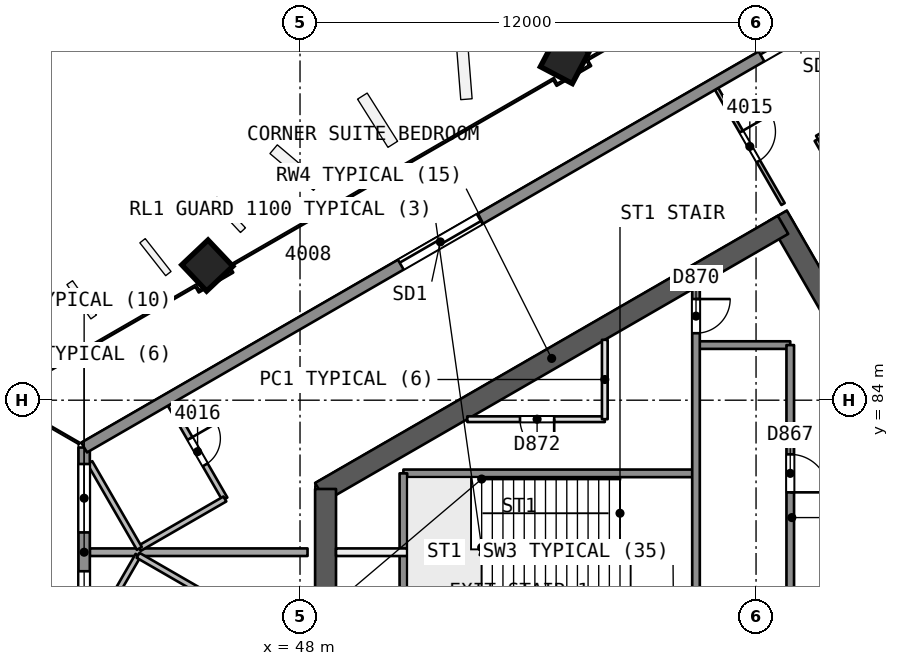
"""IFC4 building model, lengths in metres.
Left out: names, types, materials, properties, quantities, classifications, styles, units other than length and angle.
Written with IfcOpenShell. Run it as: python <this file> out.ifc"""

import sys

from ifc_helpers import new_model, si_unit, direction, frame, frame_2d, origin, origin_2d, place, context, subcontext, project, spatial, rectangle, extrude, element, fill, save


model = new_model("IFC4")
c1 = context("Model", 3, precision=1e-05, world=origin(), true_north=direction((0.0, 1.0)))
c2 = subcontext(c1, "Body", "Model", "MODEL_VIEW")
j1 = project(units=[si_unit("LENGTHUNIT", "METRE"), si_unit("PLANEANGLEUNIT", "RADIAN")], contexts=[c1])
p1 = place(None, origin())
s1 = spatial("IfcSite", under=j1, at=p1, CompositionType="ELEMENT")
p2 = place(p1, origin())
s2 = spatial("IfcBuilding", under=s1, at=p2, CompositionType="ELEMENT")
p3 = place(p2, frame((0.0, 0.0, 167.4)))
s3 = spatial("IfcBuildingStorey", under=s2, at=p3, CompositionType="ELEMENT", Elevation=167.4)
p4 = place(p3, frame((65.682, 80.0, 0.0), z_axis=(0.0, 0.0, 1.0), x_axis=(-0.500000202252, 0.866025287014, 0.0)))
e1 = element("IfcWall", 1, at=p4, inside=s3, PredefinedType="SHEAR", context=c2, shape_type="SweptSolid", body=[
    extrude(rectangle(XDim=10.221, YDim=0.55, at=frame_2d((5.111, 0.0))), origin(), (0.0, 0.0, 1.0), 3.7),
])
p5 = place(p4, frame((0.791, 0.0, 0.0)))
e2 = element("IfcOpeningElement", 2, at=p5, cuts=e1, PredefinedType="OPENING", context=c2, shape_type="SweptSolid", body=[
    extrude(rectangle(XDim=1.2, YDim=2.1, at=frame_2d((0.6, 1.05))), frame((0.0, 0.286, 0.0), z_axis=(0.0, -1.0, 0.0), x_axis=(1.0, 0.0, 0.0)), (0.0, 0.0, 1.0), 0.571),
])
p6 = place(p3, frame((60.709, 88.614, 0.0), z_axis=(0.0, 0.0, 1.0), x_axis=(-0.866020164116, -0.500009075263, 0.0)))
e3 = element("IfcWall", 3, at=p6, inside=s3, PredefinedType="SHEAR", context=c2, shape_type="SweptSolid", body=[
    extrude(rectangle(XDim=14.058, YDim=0.55, at=frame_2d((7.029, 0.0))), origin(), (0.0, 0.0, 1.0), 3.7),
])
p7 = place(p3, frame((48.672, 81.664, 0.0), z_axis=(0.0, 0.0, 1.0), x_axis=(0.0, -1.0, 0.0)))
e4 = element("IfcWall", 4, at=p7, inside=s3, PredefinedType="SHEAR", context=c2, shape_type="SweptSolid", body=[
    extrude(rectangle(XDim=3.487, YDim=0.55, at=frame_2d((1.743, 0.0))), origin(), (0.0, 0.0, 1.0), 3.7),
])
p8 = place(p3, frame((60.709, 71.386, 0.0), z_axis=(0.0, 0.0, 1.0), x_axis=(0.500015938302, 0.866016201606, 0.0)))
e5 = element("IfcWall", 5, at=p8, inside=s3, PredefinedType="SHEAR", context=c2, shape_type="SweptSolid", body=[
    extrude(rectangle(XDim=10.105, YDim=0.55, at=frame_2d((5.053, 0.0))), origin(), (0.0, 0.0, 1.0), 3.7),
])
p9 = place(p8, frame((7.955, 0.0, 0.0)))
e6 = element("IfcOpeningElement", 6, at=p9, cuts=e5, PredefinedType="OPENING", context=c2, shape_type="SweptSolid", body=[
    extrude(rectangle(XDim=1.2, YDim=2.1, at=frame_2d((0.6, 1.05))), frame((0.0, 0.286, 0.0), z_axis=(0.0, -1.0, 0.0), x_axis=(1.0, 0.0, 0.0)), (0.0, 0.0, 1.0), 0.571),
])
p10 = place(p3, frame((54.944, 92.988, 0.0), z_axis=(0.019327242333, -0.012137244332, 0.999739538582), x_axis=(-0.500208874039, 0.865669601935, 0.020179757644)))
e7 = element("IfcColumn", 7, at=p10, inside=s3, PredefinedType="COLUMN", context=c2, shape_type="SweptSolid", body=[
    extrude(rectangle(XDim=0.95, YDim=0.95, at=origin_2d()), origin(), (0.0, 0.0, 1.0), 3.701),
])
p11 = place(p3, frame((45.526, 87.551, 0.0), z_axis=(0.028557232129, -0.006793059837, 0.999569076568), x_axis=(-0.500407681469, 0.865554719029, 0.0201787188)))
e8 = element("IfcColumn", 8, at=p11, inside=s3, PredefinedType="COLUMN", context=c2, shape_type="SweptSolid", body=[
    extrude(rectangle(XDim=0.95, YDim=0.95, at=origin_2d()), origin(), (0.0, 0.0, 1.0), 3.702),
])
p12 = place(p3, frame((58.961, 92.191, 0.0), z_axis=(0.0, 0.0, 1.0), x_axis=(0.499982229883, -0.866035663123, 0.0)))
e9 = element("IfcWall", 9, at=p12, inside=s3, PredefinedType="PARTITIONING", context=c2, shape_type="SweptSolid", body=[
    extrude(rectangle(XDim=3.498, YDim=0.1, at=frame_2d((1.749, 0.0))), origin(), (0.0, 0.0, 1.0), 3.25),
])
p13 = place(p12, frame((1.299, 0.0, 0.0)))
e10 = element("IfcOpeningElement", 10, at=p13, cuts=e9, PredefinedType="OPENING", context=c2, shape_type="SweptSolid", body=[
    extrude(rectangle(XDim=0.9, YDim=2.1, at=frame_2d((0.45, 1.05))), frame((0.0, 0.061, 0.0), z_axis=(0.0, -1.0, 0.0), x_axis=(1.0, 0.0, 0.0)), (0.0, 0.0, 1.0), 0.121),
])
p14 = place(p3, frame((66.129, 83.077, 0.0), z_axis=(0.0, 0.0, 1.0), x_axis=(-0.5000018851, 0.866024315419, 0.0)))
e11 = element("IfcWall", 11, at=p14, inside=s3, PredefinedType="PARTITIONING", context=c2, shape_type="SweptSolid", body=[
    extrude(rectangle(XDim=9.0, YDim=0.2, at=frame_2d((4.5, 0.0))), origin(), (0.0, 0.0, 1.0), 3.25),
])
p15 = place(p3, frame((61.629, 90.871, 0.0), z_axis=(0.0, 0.0, 1.0), x_axis=(0.866041268327, 0.499972520799, 0.0)))
e12 = element("IfcWall", 12, at=p15, inside=s3, PredefinedType="PARTITIONING", context=c2, shape_type="SweptSolid", body=[
    extrude(rectangle(XDim=2.0, YDim=0.2, at=frame_2d((1.0, 0.0))), origin(), (0.0, 0.0, 1.0), 3.25),
])
p16 = place(p3, frame((44.585, 83.891, 0.0), z_axis=(0.0, 0.0, 1.0), x_axis=(0.500001735503, -0.866024401789, 0.0)))
e13 = element("IfcWall", 13, at=p16, inside=s3, PredefinedType="PARTITIONING", context=c2, shape_type="SweptSolid", body=[
    extrude(rectangle(XDim=2.875, YDim=0.15, at=frame_2d((1.438, 0.0))), origin(), (0.0, 0.0, 1.0), 3.25),
])
p17 = place(p16, frame((1.038, 0.0, 0.0)))
e14 = element("IfcOpeningElement", 14, at=p17, cuts=e13, PredefinedType="OPENING", context=c2, shape_type="SweptSolid", body=[
    extrude(rectangle(XDim=0.8, YDim=2.1, at=frame_2d((0.4, 1.05))), frame((0.0, 0.085, 0.0), z_axis=(0.0, -1.0, 0.0), x_axis=(1.0, 0.0, 0.0)), (0.0, 0.0, 1.0), 0.171),
])
p18 = place(p3, frame((46.023, 81.401, 0.0), z_axis=(0.0, 0.0, 1.0), x_axis=(-0.866021400173, -0.500006934395, 0.0)))
e15 = element("IfcWall", 15, at=p18, inside=s3, PredefinedType="PARTITIONING", context=c2, shape_type="SweptSolid", body=[
    extrude(rectangle(XDim=2.6, YDim=0.15, at=frame_2d((1.3, 0.0))), origin(), (0.0, 0.0, 1.0), 3.25),
])
p19 = place(p3, frame((43.771, 80.101, 0.0), z_axis=(0.0, 0.0, 1.0), x_axis=(-0.49998731371, 0.866032728093, 0.0)))
e16 = element("IfcWall", 16, at=p19, inside=s3, PredefinedType="PARTITIONING", context=c2, shape_type="SweptSolid", body=[
    extrude(rectangle(XDim=2.606, YDim=0.15, at=frame_2d((1.303, 0.0))), origin(), (0.0, 0.0, 1.0), 3.25),
])
p20 = place(p3, frame((42.468, 80.0, 0.0), z_axis=(0.0, 0.0, 1.0), x_axis=(1.0, 0.0, 0.0)))
e17 = element("IfcWall", 17, at=p20, inside=s3, PredefinedType="PARTITIONING", context=c2, shape_type="SweptSolid", body=[
    extrude(rectangle(XDim=5.73, YDim=0.2, at=frame_2d((2.865, 0.0))), origin(), (0.0, 0.0, 1.0), 3.25),
])
p21 = place(p3, frame((42.468, 77.718, 0.0), z_axis=(0.0, 0.0, 1.0), x_axis=(0.4999525809, 0.866052779484, 0.0)))
e18 = element("IfcWall", 18, at=p21, inside=s3, PredefinedType="PARTITIONING", context=c2, shape_type="SweptSolid", body=[
    extrude(rectangle(XDim=2.541, YDim=0.15, at=frame_2d((1.271, 0.0))), origin(), (0.0, 0.0, 1.0), 3.25),
])
p22 = place(p3, frame((43.739, 79.918, 0.0), z_axis=(0.0, 0.0, 1.0), x_axis=(0.866021400173, -0.500006934395, 0.0)))
e19 = element("IfcWall", 19, at=p22, inside=s3, PredefinedType="PARTITIONING", context=c2, shape_type="SweptSolid", body=[
    extrude(rectangle(XDim=2.6, YDim=0.15, at=frame_2d((1.3, 0.0))), origin(), (0.0, 0.0, 1.0), 3.25),
])
p23 = place(p3, frame((42.319, 77.245, 0.0), z_axis=(0.0, 0.0, 1.0), x_axis=(0.0, 1.0, 0.0)))
e20 = element("IfcWall", 20, at=p23, inside=s3, PredefinedType="SOLIDWALL", context=c2, shape_type="SweptSolid", body=[
    extrude(rectangle(XDim=5.509, YDim=0.3, at=frame_2d((2.755, 0.0))), origin(), (0.0, 0.0, 1.0), 3.25),
])
p24 = place(p23, frame((3.276, 0.0, 0.9)))
e21 = element("IfcOpeningElement", 21, at=p24, cuts=e20, PredefinedType="OPENING", context=c2, shape_type="SweptSolid", body=[
    extrude(rectangle(XDim=1.8, YDim=1.5, at=frame_2d((0.9, 0.75))), frame((0.0, 0.161, 0.0), z_axis=(0.0, -1.0, 0.0), x_axis=(1.0, 0.0, 0.0)), (0.0, 0.0, 1.0), 0.321),
])
p25 = place(p23, frame((0.454, 0.0, 0.9)))
e22 = element("IfcOpeningElement", 22, at=p25, cuts=e20, PredefinedType="OPENING", context=c2, shape_type="SweptSolid", body=[
    extrude(rectangle(XDim=1.8, YDim=1.5, at=frame_2d((0.9, 0.75))), frame((0.0, 0.161, 0.0), z_axis=(0.0, -1.0, 0.0), x_axis=(1.0, 0.0, 0.0)), (0.0, 0.0, 1.0), 0.321),
])
p26 = place(p3, frame((42.319, 82.755, 0.0), z_axis=(0.0, 0.0, 1.0), x_axis=(0.866024017239, 0.50000240156, 0.0)))
e23 = element("IfcWall", 23, at=p26, inside=s3, PredefinedType="SOLIDWALL", context=c2, shape_type="SweptSolid", body=[
    extrude(rectangle(XDim=53.85, YDim=0.3, at=frame_2d((26.925, 0.0))), origin(), (0.0, 0.0, 1.0), 3.25),
])
p27 = place(p26, frame((20.581, 0.0, 0.0)))
e24 = element("IfcOpeningElement", 24, at=p27, cuts=e23, PredefinedType="OPENING", context=c2, shape_type="SweptSolid", body=[
    extrude(rectangle(XDim=2.4, YDim=2.4, at=frame_2d((1.2, 1.2))), frame((0.0, 0.161, 0.0), z_axis=(0.0, -1.0, 0.0), x_axis=(1.0, 0.0, 0.0)), (0.0, 0.0, 1.0), 0.321),
])
p28 = place(p26, frame((9.622, 0.0, 0.0)))
e25 = element("IfcOpeningElement", 25, at=p28, cuts=e23, PredefinedType="OPENING", context=c2, shape_type="SweptSolid", body=[
    extrude(rectangle(XDim=2.4, YDim=2.4, at=frame_2d((1.2, 1.2))), frame((0.0, 0.161, 0.0), z_axis=(0.0, -1.0, 0.0), x_axis=(1.0, 0.0, 0.0)), (0.0, 0.0, 1.0), 0.321),
])
p29 = place(p26, frame((40.79, 0.0, 0.0)))
e26 = element("IfcOpeningElement", 26, at=p29, cuts=e23, PredefinedType="OPENING", context=c2, shape_type="SweptSolid", body=[
    extrude(rectangle(XDim=2.4, YDim=2.4, at=frame_2d((1.2, 1.2))), frame((0.0, 0.161, 0.0), z_axis=(0.0, -1.0, 0.0), x_axis=(1.0, 0.0, 0.0)), (0.0, 0.0, 1.0), 0.321),
])
p30 = place(p26, frame((27.74, 0.0, 0.9)))
e27 = element("IfcOpeningElement", 27, at=p30, cuts=e23, PredefinedType="OPENING", context=c2, shape_type="SweptSolid", body=[
    extrude(rectangle(XDim=1.8, YDim=1.5, at=frame_2d((0.9, 0.75))), frame((0.0, 0.161, 0.0), z_axis=(0.0, -1.0, 0.0), x_axis=(1.0, 0.0, 0.0)), (0.0, 0.0, 1.0), 0.321),
])
p31 = place(p26, frame((24.934, 0.0, 0.9)))
e28 = element("IfcOpeningElement", 28, at=p31, cuts=e23, PredefinedType="OPENING", context=c2, shape_type="SweptSolid", body=[
    extrude(rectangle(XDim=1.8, YDim=1.5, at=frame_2d((0.9, 0.75))), frame((0.0, 0.161, 0.0), z_axis=(0.0, -1.0, 0.0), x_axis=(1.0, 0.0, 0.0)), (0.0, 0.0, 1.0), 0.321),
])
p32 = place(p3, frame((60.9, 85.45, 0.0), z_axis=(0.0, 0.0, 1.0), x_axis=(-1.0, 0.0, 0.0)))
e29 = element("IfcWall", 29, at=p32, inside=s3, PredefinedType="SOLIDWALL", context=c2, shape_type="SweptSolid", body=[
    extrude(rectangle(XDim=2.48, YDim=0.2, at=frame_2d((1.24, 0.0))), origin(), (0.0, 0.0, 1.0), 3.25),
])
p33 = place(p3, frame((56.02, 83.5, 0.0), z_axis=(0.0, 0.0, 1.0), x_axis=(-1.0, 0.0, 0.0)))
e30 = element("IfcWall", 30, at=p33, inside=s3, PredefinedType="PARTITIONING", context=c2, shape_type="SweptSolid", body=[
    extrude(rectangle(XDim=3.618, YDim=0.15, at=frame_2d((1.809, 0.0))), origin(), (0.0, 0.0, 1.0), 3.25),
])
p34 = place(p33, frame((1.332, 0.0, 0.0)))
e31 = element("IfcOpeningElement", 31, at=p34, cuts=e30, PredefinedType="OPENING", context=c2, shape_type="SweptSolid", body=[
    extrude(rectangle(XDim=0.9, YDim=2.1, at=frame_2d((0.45, 1.05))), frame((0.0, 0.085, 0.0), z_axis=(0.0, -1.0, 0.0), x_axis=(1.0, 0.0, 0.0)), (0.0, 0.0, 1.0), 0.171),
])
p35 = place(p3, frame((58.42, 82.075, 0.0), z_axis=(0.0, 0.0, 1.0), x_axis=(-1.0, 0.0, 0.0)))
e32 = element("IfcWall", 32, at=p35, inside=s3, PredefinedType="SOLIDWALL", context=c2, shape_type="SweptSolid", body=[
    extrude(rectangle(XDim=7.7, YDim=0.2, at=frame_2d((3.85, 0.0))), origin(), (0.0, 0.0, 1.0), 3.25),
])
p36 = place(p3, frame((50.82, 80.0, 0.0), z_axis=(0.0, 0.0, 1.0), x_axis=(-1.0, 0.0, 0.0)))
e33 = element("IfcWall", 33, at=p36, inside=s3, PredefinedType="PARTITIONING", context=c2, shape_type="SweptSolid", body=[
    extrude(rectangle(XDim=1.873, YDim=0.2, at=frame_2d((0.937, 0.0))), origin(), (0.0, 0.0, 1.0), 3.25),
])
p37 = place(p3, frame((60.9, 85.45, 0.0), z_axis=(0.0, 0.0, 1.0), x_axis=(0.0, -1.0, 0.0)))
e34 = element("IfcWall", 34, at=p37, inside=s3, PredefinedType="SOLIDWALL", context=c2, shape_type="SweptSolid", body=[
    extrude(rectangle(XDim=10.9, YDim=0.2, at=frame_2d((5.45, 0.0))), origin(), (0.0, 0.0, 1.0), 3.25),
])
p38 = place(p37, frame((2.875, 0.0, 0.0)))
e35 = element("IfcOpeningElement", 35, at=p38, cuts=e34, PredefinedType="OPENING", context=c2, shape_type="SweptSolid", body=[
    extrude(rectangle(XDim=1.0, YDim=2.1, at=frame_2d((0.5, 1.05))), frame((0.0, 0.11, 0.0), z_axis=(0.0, -1.0, 0.0), x_axis=(1.0, 0.0, 0.0)), (0.0, 0.0, 1.0), 0.221),
])
p39 = place(p37, frame((7.375, 0.0, 0.0)))
e36 = element("IfcOpeningElement", 36, at=p39, cuts=e34, PredefinedType="OPENING", context=c2, shape_type="SweptSolid", body=[
    extrude(rectangle(XDim=1.0, YDim=2.1, at=frame_2d((0.5, 1.05))), frame((0.0, 0.11, 0.0), z_axis=(0.0, -1.0, 0.0), x_axis=(1.0, 0.0, 0.0)), (0.0, 0.0, 1.0), 0.221),
])
p40 = place(p3, frame((58.42, 86.974, 0.0), z_axis=(0.0, 0.0, 1.0), x_axis=(0.0, -1.0, 0.0)))
e37 = element("IfcWall", 37, at=p40, inside=s3, PredefinedType="SOLIDWALL", context=c2, shape_type="SweptSolid", body=[
    extrude(rectangle(XDim=10.524, YDim=0.2, at=frame_2d((5.262, 0.0))), origin(), (0.0, 0.0, 1.0), 3.25),
])
p41 = place(p40, frame((0.312, 0.0, 0.0)))
e38 = element("IfcOpeningElement", 38, at=p41, cuts=e37, PredefinedType="OPENING", context=c2, shape_type="SweptSolid", body=[
    extrude(rectangle(XDim=0.9, YDim=2.1, at=frame_2d((0.45, 1.05))), frame((0.0, 0.11, 0.0), z_axis=(0.0, -1.0, 0.0), x_axis=(1.0, 0.0, 0.0)), (0.0, 0.0, 1.0), 0.221),
])
p42 = place(p3, frame((56.02, 85.589, 0.0), z_axis=(0.0, 0.0, 1.0), x_axis=(0.0, -1.0, 0.0)))
e39 = element("IfcWall", 39, at=p42, inside=s3, PredefinedType="PARTITIONING", context=c2, shape_type="SweptSolid", body=[
    extrude(rectangle(XDim=2.089, YDim=0.15, at=frame_2d((1.044, 0.0))), origin(), (0.0, 0.0, 1.0), 3.25),
])
p43 = place(p3, frame((50.72, 82.075, 0.0), z_axis=(0.0, 0.0, 1.0), x_axis=(0.0, -1.0, 0.0)))
e40 = element("IfcWall", 40, at=p43, inside=s3, PredefinedType="SOLIDWALL", context=c2, shape_type="SweptSolid", body=[
    extrude(rectangle(XDim=4.15, YDim=0.2, at=frame_2d((2.075, 0.0))), origin(), (0.0, 0.0, 1.0), 3.25),
])
p44 = place(p13, origin())
e41 = element("IfcDoor", 41, at=p44, inside=s3, OperationType="SINGLE_SWING_LEFT", PredefinedType="NOTDEFINED", context=c2, shape_type="SweptSolid", body=[
    extrude(rectangle(XDim=0.9, YDim=2.1, at=frame_2d((0.45, 1.05))), frame((0.0, 0.025, 0.0), z_axis=(0.0, -1.0, 0.0), x_axis=(1.0, 0.0, 0.0)), (0.0, 0.0, 1.0), 0.05),
])
fill(e10, e41)
p45 = place(p17, origin())
e42 = element("IfcDoor", 42, at=p45, inside=s3, OperationType="SINGLE_SWING_LEFT", PredefinedType="NOTDEFINED", context=c2, shape_type="SweptSolid", body=[
    extrude(rectangle(XDim=0.8, YDim=2.1, at=frame_2d((0.4, 1.05))), frame((0.0, 0.025, 0.0), z_axis=(0.0, -1.0, 0.0), x_axis=(1.0, 0.0, 0.0)), (0.0, 0.0, 1.0), 0.05),
])
fill(e14, e42)
p46 = place(p24, origin())
e43 = element("IfcWindow", 43, at=p46, inside=s3, PartitioningType="SINGLE_PANEL", PredefinedType="WINDOW", context=c2, shape_type="SweptSolid", body=[
    extrude(rectangle(XDim=1.8, YDim=1.5, at=frame_2d((0.9, 0.75))), frame((0.0, 0.03, 0.0), z_axis=(0.0, -1.0, 0.0), x_axis=(1.0, 0.0, 0.0)), (0.0, 0.0, 1.0), 0.06),
])
fill(e21, e43)
p47 = place(p25, origin())
e44 = element("IfcWindow", 44, at=p47, inside=s3, PartitioningType="SINGLE_PANEL", PredefinedType="WINDOW", context=c2, shape_type="SweptSolid", body=[
    extrude(rectangle(XDim=1.8, YDim=1.5, at=frame_2d((0.9, 0.75))), frame((0.0, 0.03, 0.0), z_axis=(0.0, -1.0, 0.0), x_axis=(1.0, 0.0, 0.0)), (0.0, 0.0, 1.0), 0.06),
])
fill(e22, e44)
p48 = place(p27, origin())
e45 = element("IfcDoor", 45, at=p48, inside=s3, OperationType="SLIDING_TO_LEFT", PredefinedType="NOTDEFINED", context=c2, shape_type="SweptSolid", body=[
    extrude(rectangle(XDim=2.4, YDim=2.4, at=frame_2d((1.2, 1.2))), frame((0.0, 0.025, 0.0), z_axis=(0.0, -1.0, 0.0), x_axis=(1.0, 0.0, 0.0)), (0.0, 0.0, 1.0), 0.05),
])
fill(e24, e45)
p49 = place(p28, origin())
e46 = element("IfcDoor", 46, at=p49, inside=s3, OperationType="SLIDING_TO_RIGHT", PredefinedType="NOTDEFINED", context=c2, shape_type="SweptSolid", body=[
    extrude(rectangle(XDim=2.4, YDim=2.4, at=frame_2d((1.2, 1.2))), frame((0.0, 0.025, 0.0), z_axis=(0.0, -1.0, 0.0), x_axis=(1.0, 0.0, 0.0)), (0.0, 0.0, 1.0), 0.05),
])
fill(e25, e46)
p50 = place(p38, origin())
e47 = element("IfcDoor", 47, at=p50, inside=s3, OperationType="SINGLE_SWING_RIGHT", PredefinedType="NOTDEFINED", context=c2, shape_type="SweptSolid", body=[
    extrude(rectangle(XDim=1.0, YDim=2.1, at=frame_2d((0.5, 1.05))), frame((0.0, 0.025, 0.0), z_axis=(0.0, -1.0, 0.0), x_axis=(1.0, 0.0, 0.0)), (0.0, 0.0, 1.0), 0.05),
])
fill(e35, e47)
p51 = place(p41, origin())
e48 = element("IfcDoor", 48, at=p51, inside=s3, OperationType="SINGLE_SWING_LEFT", PredefinedType="NOTDEFINED", context=c2, shape_type="SweptSolid", body=[
    extrude(rectangle(XDim=0.9, YDim=2.1, at=frame_2d((0.45, 1.05))), frame((0.0, 0.025, 0.0), z_axis=(0.0, -1.0, 0.0), x_axis=(1.0, 0.0, 0.0)), (0.0, 0.0, 1.0), 0.05),
])
fill(e38, e48)
p52 = place(p34, origin())
e49 = element("IfcDoor", 49, at=p52, inside=s3, OperationType="SINGLE_SWING_LEFT", PredefinedType="NOTDEFINED", context=c2, shape_type="SweptSolid", body=[
    extrude(rectangle(XDim=0.9, YDim=2.1, at=frame_2d((0.45, 1.05))), frame((0.0, 0.025, 0.0), z_axis=(0.0, -1.0, 0.0), x_axis=(1.0, 0.0, 0.0)), (0.0, 0.0, 1.0), 0.05),
])
fill(e31, e49)
save(model, sys.argv[1])
